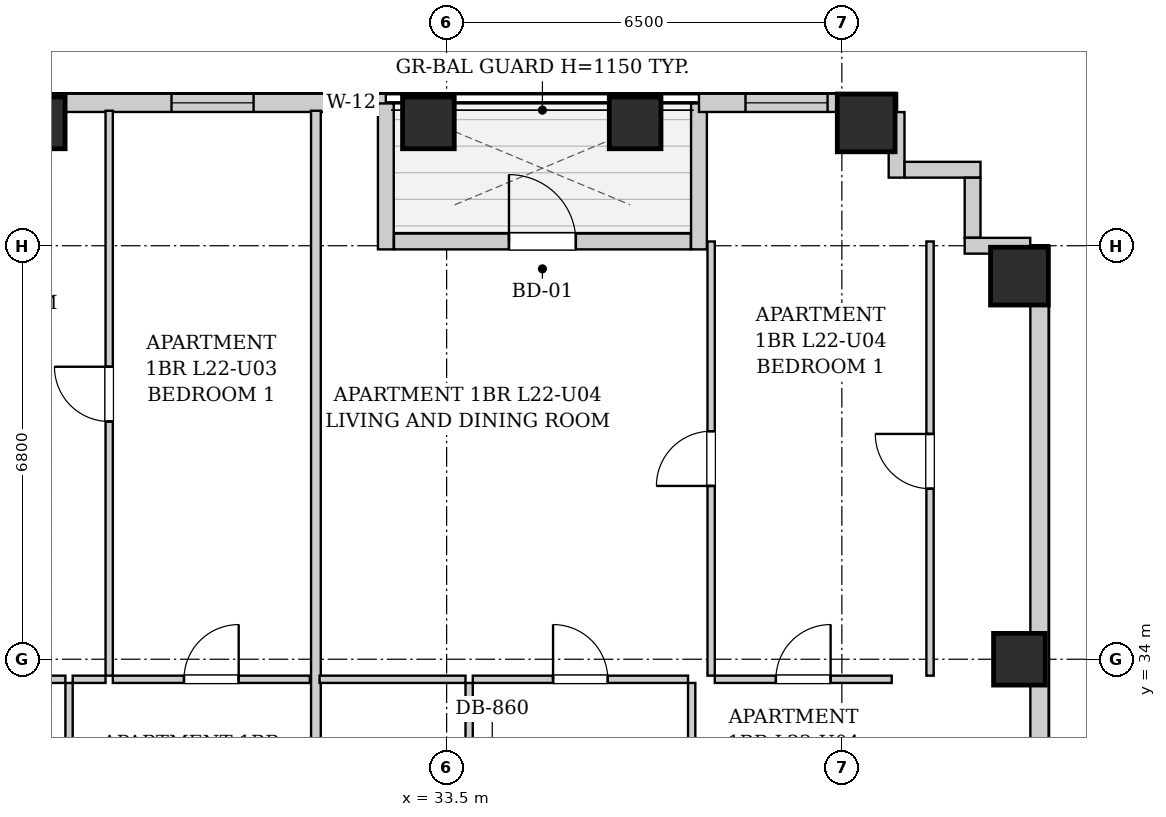
"""IFC4 building model, lengths in metres.
Left out: names, types, materials, properties, quantities, classifications, styles, units other than length and angle.
Written with IfcOpenShell. Run it as: python <this file> out.ifc"""

import sys

from ifc_helpers import new_model, si_unit, direction, frame, frame_2d, origin, origin_2d, place, context, subcontext, project, spatial, rectangle, extrude, element, fill, save


model = new_model("IFC4")
c1 = context("Model", 3, precision=1e-05, world=origin(), true_north=direction((0.0, 1.0)))
c2 = subcontext(c1, "Body", "Model", "MODEL_VIEW")
j1 = project(units=[si_unit("LENGTHUNIT", "METRE"), si_unit("PLANEANGLEUNIT", "RADIAN")], contexts=[c1])
p1 = place(None, origin())
s1 = spatial("IfcSite", under=j1, at=p1, CompositionType="ELEMENT")
p2 = place(p1, origin())
s2 = spatial("IfcBuilding", under=s1, at=p2, CompositionType="ELEMENT")
p3 = place(p2, frame((0.0, 0.0, 81.5)))
s3 = spatial("IfcBuildingStorey", under=s2, at=p3, CompositionType="ELEMENT", Elevation=81.5)
for number, where, z_axis, x_axis in (
    (1, (26.8, 42.82, 0.0), (0.0, 0.0, 1.0), (1.0, 0.0, 0.0)),
    (2, (33.2, 42.82, 0.0), (0.0, 0.0, 1.0), (1.0, 0.0, 0.0)),
    (3, (36.6, 42.82, 0.0), (0.0, 0.0, 1.0), (1.0, 0.0, 0.0)),
):
    element("IfcColumn", number, at=place(p3, frame(where, z_axis=z_axis, x_axis=x_axis)), inside=s3, PredefinedType="COLUMN", context=c2, shape_type="SweptSolid", body=[
        extrude(rectangle(XDim=0.85, YDim=0.85, at=origin_2d()), origin(), (0.0, 0.0, 1.0), 3.2),
    ])
p4 = place(p3, frame((40.4, 42.82, 0.0), z_axis=(0.0, 0.0, 1.0), x_axis=(1.0, 0.0, 0.0)))
e4 = element("IfcColumn", 4, at=p4, inside=s3, PredefinedType="COLUMN", context=c2, shape_type="SweptSolid", body=[
    extrude(rectangle(XDim=0.95, YDim=0.95, at=origin_2d()), origin(), (0.0, 0.0, 1.0), 3.2),
])
p5 = place(p3, frame((42.92, 34.0, 0.0), z_axis=(0.0, 0.0, 1.0), x_axis=(1.0, 0.0, 0.0)))
e5 = element("IfcColumn", 5, at=p5, inside=s3, PredefinedType="COLUMN", context=c2, shape_type="SweptSolid", body=[
    extrude(rectangle(XDim=0.85, YDim=0.85, at=origin_2d()), origin(), (0.0, 0.0, 1.0), 3.2),
])
p6 = place(p3, frame((42.92, 40.3, 0.0), z_axis=(0.0, 0.0, 1.0), x_axis=(1.0, 0.0, 0.0)))
e6 = element("IfcColumn", 6, at=p6, inside=s3, PredefinedType="COLUMN", context=c2, shape_type="SweptSolid", body=[
    extrude(rectangle(XDim=0.95, YDim=0.95, at=origin_2d()), origin(), (0.0, 0.0, 1.0), 3.2),
])
p7 = place(p3, frame((10.0, 43.15, 0.0), z_axis=(0.0, 0.0, 1.0), x_axis=(1.0, 0.0, 0.0)))
e7 = element("IfcWall", 7, at=p7, inside=s3, PredefinedType="SOLIDWALL", context=c2, shape_type="SweptSolid", body=[
    extrude(rectangle(XDim=22.5, YDim=0.3, at=frame_2d((11.25, 0.0))), origin(), (0.0, 0.0, 1.0), 2.94),
])
p8 = place(p7, frame((5.475, 0.0, 0.55)))
e8 = element("IfcOpeningElement", 8, at=p8, cuts=e7, PredefinedType="OPENING", context=c2, shape_type="SweptSolid", body=[
    extrude(rectangle(XDim=1.35, YDim=1.2, at=frame_2d((0.675, 0.6))), frame((0.0, 0.16, 0.0), z_axis=(0.0, -1.0, 0.0), x_axis=(1.0, 0.0, 0.0)), (0.0, 0.0, 1.0), 0.32),
])
p9 = place(p7, frame((9.3, 0.0, 0.55)))
e9 = element("IfcOpeningElement", 9, at=p9, cuts=e7, PredefinedType="OPENING", context=c2, shape_type="SweptSolid", body=[
    extrude(rectangle(XDim=1.35, YDim=1.2, at=frame_2d((0.675, 0.6))), frame((0.0, 0.16, 0.0), z_axis=(0.0, -1.0, 0.0), x_axis=(1.0, 0.0, 0.0)), (0.0, 0.0, 1.0), 0.32),
])
p10 = place(p7, frame((18.975, 0.0, 0.55)))
e10 = element("IfcOpeningElement", 10, at=p10, cuts=e7, PredefinedType="OPENING", context=c2, shape_type="SweptSolid", body=[
    extrude(rectangle(XDim=1.35, YDim=1.2, at=frame_2d((0.675, 0.6))), frame((0.0, 0.16, 0.0), z_axis=(0.0, -1.0, 0.0), x_axis=(1.0, 0.0, 0.0)), (0.0, 0.0, 1.0), 0.32),
])
p11 = place(p7, frame((21.59, 0.0, 0.55)))
e11 = element("IfcOpeningElement", 11, at=p11, cuts=e7, PredefinedType="OPENING", context=c2, shape_type="SweptSolid", body=[
    extrude(rectangle(XDim=0.68, YDim=1.2, at=frame_2d((0.34, 0.6))), frame((0.0, 0.16, 0.0), z_axis=(0.0, -1.0, 0.0), x_axis=(1.0, 0.0, 0.0)), (0.0, 0.0, 1.0), 0.32),
])
p12 = place(p3, frame((32.5, 43.14, 0.0), z_axis=(0.0, 0.0, 1.0), x_axis=(0.0, -1.0, 0.0)))
e12 = element("IfcWall", 12, at=p12, inside=s3, PredefinedType="SOLIDWALL", context=c2, shape_type="SweptSolid", body=[
    extrude(rectangle(XDim=2.4, YDim=0.26, at=frame_2d((1.2, 0.0))), origin(), (0.0, 0.0, 1.0), 2.94),
])
p13 = place(p3, frame((32.634, 40.87, 0.0), z_axis=(0.0, 0.0, 1.0), x_axis=(1.0, 0.0, 0.0)))
e13 = element("IfcWall", 13, at=p13, inside=s3, PredefinedType="SOLIDWALL", context=c2, shape_type="SweptSolid", body=[
    extrude(rectangle(XDim=4.882, YDim=0.26, at=frame_2d((2.441, 0.0))), origin(), (0.0, 0.0, 1.0), 2.94),
])
p14 = place(p13, frame((1.891, 0.0, 0.0)))
e14 = element("IfcOpeningElement", 14, at=p14, cuts=e13, PredefinedType="OPENING", context=c2, shape_type="SweptSolid", body=[
    extrude(rectangle(XDim=1.1, YDim=2.0, at=frame_2d((0.55, 1.0))), frame((0.0, 0.14, 0.0), z_axis=(0.0, -1.0, 0.0), x_axis=(1.0, 0.0, 0.0)), (0.0, 0.0, 1.0), 0.28),
])
p15 = place(p3, frame((37.65, 40.74, 0.0), z_axis=(0.0, 0.0, 1.0), x_axis=(0.0, 1.0, 0.0)))
e15 = element("IfcWall", 15, at=p15, inside=s3, PredefinedType="SOLIDWALL", context=c2, shape_type="SweptSolid", body=[
    extrude(rectangle(XDim=2.4, YDim=0.26, at=frame_2d((1.2, 0.0))), origin(), (0.0, 0.0, 1.0), 2.94),
])
p16 = place(p3, frame((37.65, 43.15, 0.0), z_axis=(0.0, 0.0, 1.0), x_axis=(1.0, 0.0, 0.0)))
e16 = element("IfcWall", 16, at=p16, inside=s3, PredefinedType="SOLIDWALL", context=c2, shape_type="SweptSolid", body=[
    extrude(rectangle(XDim=3.25, YDim=0.3, at=frame_2d((1.625, 0.0))), origin(), (0.0, 0.0, 1.0), 2.94),
])
p17 = place(p16, frame((0.765, 0.0, 0.55)))
e17 = element("IfcOpeningElement", 17, at=p17, cuts=e16, PredefinedType="OPENING", context=c2, shape_type="SweptSolid", body=[
    extrude(rectangle(XDim=1.35, YDim=1.2, at=frame_2d((0.675, 0.6))), frame((0.0, 0.16, 0.0), z_axis=(0.0, -1.0, 0.0), x_axis=(1.0, 0.0, 0.0)), (0.0, 0.0, 1.0), 0.32),
])
p18 = place(p3, frame((43.25, 40.8, 0.0), z_axis=(0.0, 0.0, 1.0), x_axis=(0.0, -1.0, 0.0)))
e18 = element("IfcWall", 18, at=p18, inside=s3, PredefinedType="SOLIDWALL", context=c2, shape_type="SweptSolid", body=[
    extrude(rectangle(XDim=12.6, YDim=0.3, at=frame_2d((6.3, 0.0))), origin(), (0.0, 0.0, 1.0), 2.94),
])
p19 = place(p3, frame((40.9, 42.998, 0.0), z_axis=(0.0, 0.0, 1.0), x_axis=(0.0, -1.0, 0.0)))
e19 = element("IfcWall", 19, at=p19, inside=s3, PredefinedType="SOLIDWALL", context=c2, shape_type="SweptSolid", body=[
    extrude(rectangle(XDim=1.078, YDim=0.26, at=frame_2d((0.539, 0.0))), origin(), (0.0, 0.0, 1.0), 2.94),
])
p20 = place(p3, frame((41.032, 42.05, 0.0), z_axis=(0.0, 0.0, 1.0), x_axis=(1.0, 0.0, 0.0)))
e20 = element("IfcWall", 20, at=p20, inside=s3, PredefinedType="SOLIDWALL", context=c2, shape_type="SweptSolid", body=[
    extrude(rectangle(XDim=1.248, YDim=0.26, at=frame_2d((0.624, 0.0))), origin(), (0.0, 0.0, 1.0), 2.94),
])
p21 = place(p3, frame((42.15, 41.918, 0.0), z_axis=(0.0, 0.0, 1.0), x_axis=(0.0, -1.0, 0.0)))
e21 = element("IfcWall", 21, at=p21, inside=s3, PredefinedType="SOLIDWALL", context=c2, shape_type="SweptSolid", body=[
    extrude(rectangle(XDim=0.986, YDim=0.26, at=frame_2d((0.493, 0.0))), origin(), (0.0, 0.0, 1.0), 2.94),
])
p22 = place(p3, frame((42.02, 40.8, 0.0), z_axis=(0.0, 0.0, 1.0), x_axis=(1.0, 0.0, 0.0)))
e22 = element("IfcWall", 22, at=p22, inside=s3, PredefinedType="SOLIDWALL", context=c2, shape_type="SweptSolid", body=[
    extrude(rectangle(XDim=1.078, YDim=0.26, at=frame_2d((0.539, 0.0))), origin(), (0.0, 0.0, 1.0), 2.94),
])
p23 = place(p3, frame((27.29, 30.76, 0.0), z_axis=(0.0, 0.0, 1.0), x_axis=(0.0, 1.0, 0.0)))
e23 = element("IfcWall", 23, at=p23, inside=s3, PredefinedType="PARTITIONING", context=c2, shape_type="SweptSolid", body=[
    extrude(rectangle(XDim=2.85, YDim=0.12, at=frame_2d((1.425, 0.0))), origin(), (0.0, 0.0, 1.0), 2.94),
])
p24 = place(p23, frame((0.975, 0.0, 0.0)))
e24 = element("IfcOpeningElement", 24, at=p24, cuts=e23, PredefinedType="OPENING", context=c2, shape_type="SweptSolid", body=[
    extrude(rectangle(XDim=0.9, YDim=2.05, at=frame_2d((0.45, 1.025))), frame((0.0, 0.07, 0.0), z_axis=(0.0, -1.0, 0.0), x_axis=(1.0, 0.0, 0.0)), (0.0, 0.0, 1.0), 0.14),
])
p25 = place(p3, frame((23.63, 33.67, 0.0), z_axis=(0.0, 0.0, 1.0), x_axis=(1.0, 0.0, 0.0)))
e25 = element("IfcWall", 25, at=p25, inside=s3, PredefinedType="PARTITIONING", context=c2, shape_type="SweptSolid", body=[
    extrude(rectangle(XDim=3.6, YDim=0.12, at=frame_2d((1.8, 0.0))), origin(), (0.0, 0.0, 1.0), 2.94),
])
p26 = place(p25, frame((1.35, 0.0, 0.0)))
e26 = element("IfcOpeningElement", 26, at=p26, cuts=e25, PredefinedType="OPENING", context=c2, shape_type="SweptSolid", body=[
    extrude(rectangle(XDim=0.9, YDim=2.05, at=frame_2d((0.45, 1.025))), frame((0.0, 0.07, 0.0), z_axis=(0.0, -1.0, 0.0), x_axis=(1.0, 0.0, 0.0)), (0.0, 0.0, 1.0), 0.14),
])
p27 = place(p3, frame((27.35, 33.67, 0.0), z_axis=(0.0, 0.0, 1.0), x_axis=(1.0, 0.0, 0.0)))
e27 = element("IfcWall", 27, at=p27, inside=s3, PredefinedType="PARTITIONING", context=c2, shape_type="SweptSolid", body=[
    extrude(rectangle(XDim=0.54, YDim=0.12, at=frame_2d((0.27, 0.0))), origin(), (0.0, 0.0, 1.0), 2.94),
])
p28 = place(p3, frame((28.01, 33.67, 0.0), z_axis=(0.0, 0.0, 1.0), x_axis=(1.0, 0.0, 0.0)))
e28 = element("IfcWall", 28, at=p28, inside=s3, PredefinedType="PARTITIONING", context=c2, shape_type="SweptSolid", body=[
    extrude(rectangle(XDim=3.24, YDim=0.12, at=frame_2d((1.62, 0.0))), origin(), (0.0, 0.0, 1.0), 2.94),
])
p29 = place(p28, frame((1.17, 0.0, 0.0)))
e29 = element("IfcOpeningElement", 29, at=p29, cuts=e28, PredefinedType="OPENING", context=c2, shape_type="SweptSolid", body=[
    extrude(rectangle(XDim=0.9, YDim=2.05, at=frame_2d((0.45, 1.025))), frame((0.0, 0.07, 0.0), z_axis=(0.0, -1.0, 0.0), x_axis=(1.0, 0.0, 0.0)), (0.0, 0.0, 1.0), 0.14),
])
p30 = place(p3, frame((27.95, 33.73, 0.0), z_axis=(0.0, 0.0, 1.0), x_axis=(0.0, 1.0, 0.0)))
e30 = element("IfcWall", 30, at=p30, inside=s3, PredefinedType="PARTITIONING", context=c2, shape_type="SweptSolid", body=[
    extrude(rectangle(XDim=9.29, YDim=0.12, at=frame_2d((4.645, 0.0))), origin(), (0.0, 0.0, 1.0), 2.94),
])
p31 = place(p30, frame((4.18, 0.0, 0.0)))
e31 = element("IfcOpeningElement", 31, at=p31, cuts=e30, PredefinedType="OPENING", context=c2, shape_type="SweptSolid", body=[
    extrude(rectangle(XDim=0.9, YDim=2.05, at=frame_2d((0.45, 1.025))), frame((0.0, 0.07, 0.0), z_axis=(0.0, -1.0, 0.0), x_axis=(1.0, 0.0, 0.0)), (0.0, 0.0, 1.0), 0.14),
])
p32 = place(p3, frame((31.35, 30.76, 0.0), z_axis=(0.0, 0.0, 1.0), x_axis=(0.0, 1.0, 0.0)))
e32 = element("IfcWall", 32, at=p32, inside=s3, PredefinedType="PARTITIONING", context=c2, shape_type="SweptSolid", body=[
    extrude(rectangle(XDim=12.26, YDim=0.16, at=frame_2d((6.13, 0.0))), origin(), (0.0, 0.0, 1.0), 2.94),
])
p33 = place(p3, frame((33.87, 30.76, 0.0), z_axis=(0.0, 0.0, 1.0), x_axis=(0.0, 1.0, 0.0)))
e33 = element("IfcWall", 33, at=p33, inside=s3, PredefinedType="PARTITIONING", context=c2, shape_type="SweptSolid", body=[
    extrude(rectangle(XDim=2.85, YDim=0.12, at=frame_2d((1.425, 0.0))), origin(), (0.0, 0.0, 1.0), 2.94),
])
p34 = place(p33, frame((0.995, 0.0, 0.0)))
e34 = element("IfcOpeningElement", 34, at=p34, cuts=e33, PredefinedType="OPENING", context=c2, shape_type="SweptSolid", body=[
    extrude(rectangle(XDim=0.86, YDim=2.05, at=frame_2d((0.43, 1.025))), frame((0.0, 0.07, 0.0), z_axis=(0.0, -1.0, 0.0), x_axis=(1.0, 0.0, 0.0)), (0.0, 0.0, 1.0), 0.14),
])
p35 = place(p3, frame((31.41, 33.67, 0.0), z_axis=(0.0, 0.0, 1.0), x_axis=(1.0, 0.0, 0.0)))
e35 = element("IfcWall", 35, at=p35, inside=s3, PredefinedType="PARTITIONING", context=c2, shape_type="SweptSolid", body=[
    extrude(rectangle(XDim=2.4, YDim=0.12, at=frame_2d((1.2, 0.0))), origin(), (0.0, 0.0, 1.0), 2.94),
])
p36 = place(p3, frame((37.53, 30.76, 0.0), z_axis=(0.0, 0.0, 1.0), x_axis=(0.0, 1.0, 0.0)))
e36 = element("IfcWall", 36, at=p36, inside=s3, PredefinedType="PARTITIONING", context=c2, shape_type="SweptSolid", body=[
    extrude(rectangle(XDim=2.85, YDim=0.12, at=frame_2d((1.425, 0.0))), origin(), (0.0, 0.0, 1.0), 2.94),
])
p37 = place(p36, frame((0.975, 0.0, 0.0)))
e37 = element("IfcOpeningElement", 37, at=p37, cuts=e36, PredefinedType="OPENING", context=c2, shape_type="SweptSolid", body=[
    extrude(rectangle(XDim=0.9, YDim=2.05, at=frame_2d((0.45, 1.025))), frame((0.0, 0.07, 0.0), z_axis=(0.0, -1.0, 0.0), x_axis=(1.0, 0.0, 0.0)), (0.0, 0.0, 1.0), 0.14),
])
p38 = place(p3, frame((33.93, 33.67, 0.0), z_axis=(0.0, 0.0, 1.0), x_axis=(1.0, 0.0, 0.0)))
e38 = element("IfcWall", 38, at=p38, inside=s3, PredefinedType="PARTITIONING", context=c2, shape_type="SweptSolid", body=[
    extrude(rectangle(XDim=3.54, YDim=0.12, at=frame_2d((1.77, 0.0))), origin(), (0.0, 0.0, 1.0), 2.94),
])
p39 = place(p38, frame((1.32, 0.0, 0.0)))
e39 = element("IfcOpeningElement", 39, at=p39, cuts=e38, PredefinedType="OPENING", context=c2, shape_type="SweptSolid", body=[
    extrude(rectangle(XDim=0.9, YDim=2.05, at=frame_2d((0.45, 1.025))), frame((0.0, 0.07, 0.0), z_axis=(0.0, -1.0, 0.0), x_axis=(1.0, 0.0, 0.0)), (0.0, 0.0, 1.0), 0.14),
])
p40 = place(p3, frame((37.91, 33.67, 0.0), z_axis=(0.0, 0.0, 1.0), x_axis=(1.0, 0.0, 0.0)))
e40 = element("IfcWall", 40, at=p40, inside=s3, PredefinedType="PARTITIONING", context=c2, shape_type="SweptSolid", body=[
    extrude(rectangle(XDim=2.91, YDim=0.12, at=frame_2d((1.455, 0.0))), origin(), (0.0, 0.0, 1.0), 2.94),
])
p41 = place(p40, frame((1.005, 0.0, 0.0)))
e41 = element("IfcOpeningElement", 41, at=p41, cuts=e40, PredefinedType="OPENING", context=c2, shape_type="SweptSolid", body=[
    extrude(rectangle(XDim=0.9, YDim=2.05, at=frame_2d((0.45, 1.025))), frame((0.0, 0.07, 0.0), z_axis=(0.0, -1.0, 0.0), x_axis=(1.0, 0.0, 0.0)), (0.0, 0.0, 1.0), 0.14),
])
p42 = place(p3, frame((37.85, 33.73, 0.0), z_axis=(0.0, 0.0, 1.0), x_axis=(0.0, 1.0, 0.0)))
e42 = element("IfcWall", 42, at=p42, inside=s3, PredefinedType="PARTITIONING", context=c2, shape_type="SweptSolid", body=[
    extrude(rectangle(XDim=7.14, YDim=0.12, at=frame_2d((3.57, 0.0))), origin(), (0.0, 0.0, 1.0), 2.94),
])
p43 = place(p42, frame((3.12, 0.0, 0.0)))
e43 = element("IfcOpeningElement", 43, at=p43, cuts=e42, PredefinedType="OPENING", context=c2, shape_type="SweptSolid", body=[
    extrude(rectangle(XDim=0.9, YDim=2.05, at=frame_2d((0.45, 1.025))), frame((0.0, 0.07, 0.0), z_axis=(0.0, -1.0, 0.0), x_axis=(1.0, 0.0, 0.0)), (0.0, 0.0, 1.0), 0.14),
])
p44 = place(p3, frame((41.45, 33.73, 0.0), z_axis=(0.0, 0.0, 1.0), x_axis=(0.0, 1.0, 0.0)))
e44 = element("IfcWall", 44, at=p44, inside=s3, PredefinedType="PARTITIONING", context=c2, shape_type="SweptSolid", body=[
    extrude(rectangle(XDim=7.14, YDim=0.12, at=frame_2d((3.57, 0.0))), origin(), (0.0, 0.0, 1.0), 2.94),
])
p45 = place(p44, frame((3.075, 0.0, 0.0)))
e45 = element("IfcOpeningElement", 45, at=p45, cuts=e44, PredefinedType="OPENING", context=c2, shape_type="SweptSolid", body=[
    extrude(rectangle(XDim=0.9, YDim=2.05, at=frame_2d((0.45, 1.025))), frame((0.0, 0.07, 0.0), z_axis=(0.0, -1.0, 0.0), x_axis=(1.0, 0.0, 0.0)), (0.0, 0.0, 1.0), 0.14),
])
p46 = place(p29, origin())
e46 = element("IfcDoor", 46, at=p46, inside=s3, OperationType="SINGLE_SWING_RIGHT", PredefinedType="DOOR", context=c2, shape_type="SweptSolid", body=[
    extrude(rectangle(XDim=0.9, YDim=2.05, at=frame_2d((0.45, 1.025))), frame((0.0, 0.025, 0.0), z_axis=(0.0, -1.0, 0.0), x_axis=(1.0, 0.0, 0.0)), (0.0, 0.0, 1.0), 0.05),
])
fill(e29, e46)
p47 = place(p31, origin())
e47 = element("IfcDoor", 47, at=p47, inside=s3, OperationType="SINGLE_SWING_RIGHT", PredefinedType="DOOR", context=c2, shape_type="SweptSolid", body=[
    extrude(rectangle(XDim=0.9, YDim=2.05, at=frame_2d((0.45, 1.025))), frame((0.0, 0.025, 0.0), z_axis=(0.0, -1.0, 0.0), x_axis=(1.0, 0.0, 0.0)), (0.0, 0.0, 1.0), 0.05),
])
fill(e31, e47)
p48 = place(p39, origin())
e48 = element("IfcDoor", 48, at=p48, inside=s3, OperationType="SINGLE_SWING_LEFT", PredefinedType="DOOR", context=c2, shape_type="SweptSolid", body=[
    extrude(rectangle(XDim=0.9, YDim=2.05, at=frame_2d((0.45, 1.025))), frame((0.0, 0.025, 0.0), z_axis=(0.0, -1.0, 0.0), x_axis=(1.0, 0.0, 0.0)), (0.0, 0.0, 1.0), 0.05),
])
fill(e39, e48)
p49 = place(p41, origin())
e49 = element("IfcDoor", 49, at=p49, inside=s3, OperationType="SINGLE_SWING_RIGHT", PredefinedType="DOOR", context=c2, shape_type="SweptSolid", body=[
    extrude(rectangle(XDim=0.9, YDim=2.05, at=frame_2d((0.45, 1.025))), frame((0.0, 0.025, 0.0), z_axis=(0.0, -1.0, 0.0), x_axis=(1.0, 0.0, 0.0)), (0.0, 0.0, 1.0), 0.05),
])
fill(e41, e49)
p50 = place(p43, origin())
e50 = element("IfcDoor", 50, at=p50, inside=s3, OperationType="SINGLE_SWING_LEFT", PredefinedType="DOOR", context=c2, shape_type="SweptSolid", body=[
    extrude(rectangle(XDim=0.9, YDim=2.05, at=frame_2d((0.45, 1.025))), frame((0.0, 0.025, 0.0), z_axis=(0.0, -1.0, 0.0), x_axis=(1.0, 0.0, 0.0)), (0.0, 0.0, 1.0), 0.05),
])
fill(e43, e50)
p51 = place(p45, origin())
e51 = element("IfcDoor", 51, at=p51, inside=s3, OperationType="SINGLE_SWING_RIGHT", PredefinedType="DOOR", context=c2, shape_type="SweptSolid", body=[
    extrude(rectangle(XDim=0.9, YDim=2.05, at=frame_2d((0.45, 1.025))), frame((0.0, 0.025, 0.0), z_axis=(0.0, -1.0, 0.0), x_axis=(1.0, 0.0, 0.0)), (0.0, 0.0, 1.0), 0.05),
])
fill(e45, e51)
p52 = place(p14, origin())
e52 = element("IfcDoor", 52, at=p52, inside=s3, OperationType="SINGLE_SWING_LEFT", PredefinedType="DOOR", context=c2, shape_type="SweptSolid", body=[
    extrude(rectangle(XDim=1.1, YDim=2.0, at=frame_2d((0.55, 1.0))), frame((0.0, 0.025, 0.0), z_axis=(0.0, -1.0, 0.0), x_axis=(1.0, 0.0, 0.0)), (0.0, 0.0, 1.0), 0.05),
])
fill(e14, e52)
p53 = place(p10, origin())
e53 = element("IfcWindow", 53, at=p53, inside=s3, PartitioningType="SINGLE_PANEL", PredefinedType="WINDOW", context=c2, shape_type="SweptSolid", body=[
    extrude(rectangle(XDim=1.35, YDim=1.2, at=frame_2d((0.675, 0.6))), frame((0.0, 0.03, 0.0), z_axis=(0.0, -1.0, 0.0), x_axis=(1.0, 0.0, 0.0)), (0.0, 0.0, 1.0), 0.06),
])
fill(e10, e53)
p54 = place(p11, origin())
e54 = element("IfcWindow", 54, at=p54, inside=s3, PartitioningType="SINGLE_PANEL", PredefinedType="WINDOW", context=c2, shape_type="SweptSolid", body=[
    extrude(rectangle(XDim=0.68, YDim=1.2, at=frame_2d((0.34, 0.6))), frame((0.0, 0.03, 0.0), z_axis=(0.0, -1.0, 0.0), x_axis=(1.0, 0.0, 0.0)), (0.0, 0.0, 1.0), 0.06),
])
fill(e11, e54)
p55 = place(p17, origin())
e55 = element("IfcWindow", 55, at=p55, inside=s3, PartitioningType="SINGLE_PANEL", PredefinedType="WINDOW", context=c2, shape_type="SweptSolid", body=[
    extrude(rectangle(XDim=1.35, YDim=1.2, at=frame_2d((0.675, 0.6))), frame((0.0, 0.03, 0.0), z_axis=(0.0, -1.0, 0.0), x_axis=(1.0, 0.0, 0.0)), (0.0, 0.0, 1.0), 0.06),
])
fill(e17, e55)
save(model, sys.argv[1])
